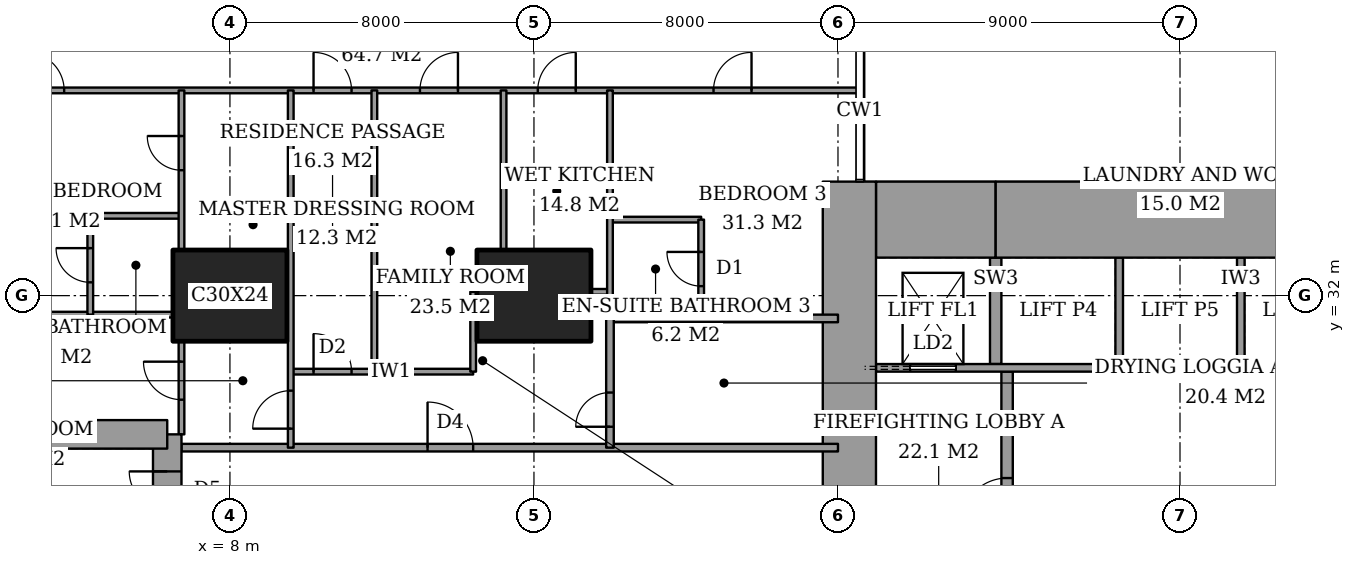
"""IFC4 building model, lengths in metres.
Left out: names, types, materials, properties, quantities, classifications, styles, units other than length and angle.
Written with IfcOpenShell. Run it as: python <this file> out.ifc"""

import sys

from ifc_helpers import new_model, si_unit, direction, frame, frame_2d, origin, origin_2d, place, context, subcontext, project, spatial, rectangle, extrude, element, fill, save


model = new_model("IFC4")
c1 = context("Model", 3, precision=1e-05, world=origin(), true_north=direction((0.0, 1.0)))
c2 = subcontext(c1, "Body", "Model", "MODEL_VIEW")
j1 = project(units=[si_unit("LENGTHUNIT", "METRE"), si_unit("PLANEANGLEUNIT", "RADIAN")], contexts=[c1])
p1 = place(None, origin())
s1 = spatial("IfcSite", under=j1, at=p1, CompositionType="ELEMENT")
p2 = place(p1, origin())
s2 = spatial("IfcBuilding", under=s1, at=p2, CompositionType="ELEMENT")
p3 = place(p2, frame((0.0, 0.0, 62.0)))
s3 = spatial("IfcBuildingStorey", under=s2, at=p3, CompositionType="ELEMENT", Elevation=62.0)
for number, where, z_axis, x_axis in (
    (1, (8.0, 32.0, 0.0), (0.0, 0.0, 1.0), (1.0, 0.0, 0.0)),
    (2, (16.0, 32.0, 0.0), (0.0, 0.0, 1.0), (1.0, 0.0, 0.0)),
):
    element("IfcColumn", number, at=place(p3, frame(where, z_axis=z_axis, x_axis=x_axis)), inside=s3, PredefinedType="COLUMN", context=c2, shape_type="SweptSolid", body=[
        extrude(rectangle(XDim=3.0, YDim=2.4, at=origin_2d()), origin(), (0.0, 0.0, 1.0), 3.6),
    ])
p4 = place(p3, frame((25.0, 34.0, 0.0), z_axis=(0.0, 0.0, 1.0), x_axis=(1.0, 0.0, 0.0)))
e3 = element("IfcWall", 3, at=p4, inside=s3, PredefinedType="SHEAR", context=c2, shape_type="SweptSolid", body=[
    extrude(rectangle(XDim=3.15, YDim=2.0, at=frame_2d((1.575, 0.0))), origin(), (0.0, 0.0, 1.0), 3.6),
])
p5 = place(p3, frame((28.15, 34.0, 0.0), z_axis=(0.0, 0.0, 1.0), x_axis=(1.0, 0.0, 0.0)))
e4 = element("IfcWall", 4, at=p5, inside=s3, PredefinedType="SHEAR", context=c2, shape_type="SweptSolid", body=[
    extrude(rectangle(XDim=9.7, YDim=2.0, at=frame_2d((4.85, 0.0))), origin(), (0.0, 0.0, 1.0), 3.6),
])
p6 = place(p3, frame((24.3, 23.15, 0.0), z_axis=(0.0, 0.0, 1.0), x_axis=(0.0, 1.0, 0.0)))
e5 = element("IfcWall", 5, at=p6, inside=s3, PredefinedType="SHEAR", context=c2, shape_type="SweptSolid", body=[
    extrude(rectangle(XDim=11.85, YDim=1.4, at=frame_2d((5.925, 0.0))), origin(), (0.0, 0.0, 1.0), 3.6),
])
p7 = place(p6, frame((0.75, 0.0, 0.0)))
e6 = element("IfcOpeningElement", 6, at=p7, cuts=e5, PredefinedType="OPENING", context=c2, shape_type="SweptSolid", body=[
    extrude(rectangle(XDim=1.8, YDim=2.4, at=frame_2d((0.9, 1.2))), frame((0.0, 0.71, 0.0), z_axis=(0.0, -1.0, 0.0), x_axis=(1.0, 0.0, 0.0)), (0.0, 0.0, 1.0), 1.42),
])
p8 = place(p3, frame((28.45, 23.3, 0.0), z_axis=(0.0, 0.0, 1.0), x_axis=(0.0, 1.0, 0.0)))
e7 = element("IfcWall", 7, at=p8, inside=s3, PredefinedType="PARTITIONING", context=c2, shape_type="SweptSolid", body=[
    extrude(rectangle(XDim=6.7, YDim=0.3, at=frame_2d((3.35, 0.0))), origin(), (0.0, 0.0, 1.0), 3.6),
])
p9 = place(p8, frame((2.7, 0.0, 0.0)))
e8 = element("IfcOpeningElement", 8, at=p9, cuts=e7, PredefinedType="OPENING", context=c2, shape_type="SweptSolid", body=[
    extrude(rectangle(XDim=1.2, YDim=2.1, at=frame_2d((0.6, 1.05))), frame((0.0, 0.16, 0.0), z_axis=(0.0, -1.0, 0.0), x_axis=(1.0, 0.0, 0.0)), (0.0, 0.0, 1.0), 0.32),
])
p10 = place(p3, frame((6.35, 19.65, 0.0), z_axis=(0.0, 0.0, 1.0), x_axis=(0.0, 1.0, 0.0)))
e9 = element("IfcWall", 9, at=p10, inside=s3, PredefinedType="SHEAR", context=c2, shape_type="SweptSolid", body=[
    extrude(rectangle(XDim=8.7, YDim=0.75, at=frame_2d((4.35, 0.0))), origin(), (0.0, 0.0, 1.0), 3.6),
])
p11 = place(p10, frame((6.725, 0.0, 0.0)))
e10 = element("IfcOpeningElement", 10, at=p11, cuts=e9, PredefinedType="OPENING", context=c2, shape_type="SweptSolid", body=[
    extrude(rectangle(XDim=1.0, YDim=2.1, at=frame_2d((0.5, 1.05))), frame((0.0, 0.385, 0.0), z_axis=(0.0, -1.0, 0.0), x_axis=(1.0, 0.0, 0.0)), (0.0, 0.0, 1.0), 0.77),
])
p12 = place(p3, frame((6.35, 28.35, 0.0), z_axis=(0.0, 0.0, 1.0), x_axis=(-1.0, 0.0, 0.0)))
e11 = element("IfcWall", 11, at=p12, inside=s3, PredefinedType="SHEAR", context=c2, shape_type="SweptSolid", body=[
    extrude(rectangle(XDim=4.45, YDim=0.75, at=frame_2d((2.225, 0.0))), origin(), (0.0, 0.0, 1.0), 3.6),
])
p13 = place(p3, frame((6.725, 28.0, 0.0), z_axis=(0.0, 0.0, 1.0), x_axis=(1.0, 0.0, 0.0)))
e12 = element("IfcWall", 12, at=p13, inside=s3, PredefinedType="PARTITIONING", context=c2, shape_type="SweptSolid", body=[
    extrude(rectangle(XDim=17.275, YDim=0.2, at=frame_2d((8.637, 0.0))), origin(), (0.0, 0.0, 1.0), 3.35),
])
p14 = place(p13, frame((6.475, 0.0, 0.0)))
e13 = element("IfcOpeningElement", 13, at=p14, cuts=e12, PredefinedType="OPENING", context=c2, shape_type="SweptSolid", body=[
    extrude(rectangle(XDim=1.2, YDim=2.4, at=frame_2d((0.6, 1.2))), frame((0.0, 0.11, 0.0), z_axis=(0.0, -1.0, 0.0), x_axis=(1.0, 0.0, 0.0)), (0.0, 0.0, 1.0), 0.22),
])
p15 = place(p3, frame((9.6, 30.0, 0.0), z_axis=(0.0, 0.0, 1.0), x_axis=(1.0, 0.0, 0.0)))
e14 = element("IfcWall", 14, at=p15, inside=s3, PredefinedType="PARTITIONING", context=c2, shape_type="SweptSolid", body=[
    extrude(rectangle(XDim=4.8, YDim=0.15, at=frame_2d((2.4, 0.0))), origin(), (0.0, 0.0, 1.0), 3.35),
])
p16 = place(p15, frame((0.6, 0.0, 0.0)))
e15 = element("IfcOpeningElement", 15, at=p16, cuts=e14, PredefinedType="OPENING", context=c2, shape_type="SweptSolid", body=[
    extrude(rectangle(XDim=1.0, YDim=2.1, at=frame_2d((0.5, 1.05))), frame((0.0, 0.085, 0.0), z_axis=(0.0, -1.0, 0.0), x_axis=(1.0, 0.0, 0.0)), (0.0, 0.0, 1.0), 0.17),
])
p17 = place(p3, frame((18.0, 31.4, 0.0), z_axis=(0.0, 0.0, 1.0), x_axis=(1.0, 0.0, 0.0)))
e16 = element("IfcWall", 16, at=p17, inside=s3, PredefinedType="PARTITIONING", context=c2, shape_type="SweptSolid", body=[
    extrude(rectangle(XDim=6.0, YDim=0.2, at=frame_2d((3.0, 0.0))), origin(), (0.0, 0.0, 1.0), 3.35),
])
p18 = place(p3, frame((1.35, 31.5, 0.0), z_axis=(0.0, 0.0, 1.0), x_axis=(1.0, 0.0, 0.0)))
e17 = element("IfcWall", 17, at=p18, inside=s3, PredefinedType="PARTITIONING", context=c2, shape_type="SweptSolid", body=[
    extrude(rectangle(XDim=5.15, YDim=0.15, at=frame_2d((2.575, 0.0))), origin(), (0.0, 0.0, 1.0), 3.35),
])
p19 = place(p3, frame((17.5, 32.1, 0.0), z_axis=(0.0, 0.0, 1.0), x_axis=(1.0, 0.0, 0.0)))
e18 = element("IfcWall", 18, at=p19, inside=s3, PredefinedType="PARTITIONING", context=c2, shape_type="SweptSolid", body=[
    extrude(rectangle(XDim=0.5, YDim=0.15, at=frame_2d((0.25, 0.0))), origin(), (0.0, 0.0, 1.0), 2.634),
])
p20 = place(p3, frame((18.0, 34.0, 0.0), z_axis=(0.0, 0.0, 1.0), x_axis=(1.0, 0.0, 0.0)))
e19 = element("IfcWall", 19, at=p20, inside=s3, PredefinedType="PARTITIONING", context=c2, shape_type="SweptSolid", body=[
    extrude(rectangle(XDim=2.4, YDim=0.15, at=frame_2d((1.2, 0.0))), origin(), (0.0, 0.0, 1.0), 3.35),
])
p21 = place(p3, frame((4.325, 34.1, 0.0), z_axis=(0.0, 0.0, 1.0), x_axis=(1.0, 0.0, 0.0)))
e20 = element("IfcWall", 20, at=p21, inside=s3, PredefinedType="PARTITIONING", context=c2, shape_type="SweptSolid", body=[
    extrude(rectangle(XDim=2.4, YDim=0.15, at=frame_2d((1.2, 0.0))), origin(), (0.0, 0.0, 1.0), 3.35),
])
p22 = place(p3, frame((-0.45, 37.4, 0.0), z_axis=(0.0, 0.0, 1.0), x_axis=(1.0, 0.0, 0.0)))
e21 = element("IfcWall", 21, at=p22, inside=s3, PredefinedType="PARTITIONING", context=c2, shape_type="SweptSolid", body=[
    extrude(rectangle(XDim=25.011, YDim=0.15, at=frame_2d((12.505, 0.0))), origin(), (0.0, 0.0, 1.0), 3.35),
])
p23 = place(p22, frame((10.65, 0.0, 0.0)))
e22 = element("IfcOpeningElement", 22, at=p23, cuts=e21, PredefinedType="OPENING", context=c2, shape_type="SweptSolid", body=[
    extrude(rectangle(XDim=1.0, YDim=2.1, at=frame_2d((0.5, 1.05))), frame((0.0, 0.085, 0.0), z_axis=(0.0, -1.0, 0.0), x_axis=(1.0, 0.0, 0.0)), (0.0, 0.0, 1.0), 0.17),
])
p24 = place(p22, frame((3.087, 0.0, 0.0)))
e23 = element("IfcOpeningElement", 23, at=p24, cuts=e21, PredefinedType="OPENING", context=c2, shape_type="SweptSolid", body=[
    extrude(rectangle(XDim=1.0, YDim=2.1, at=frame_2d((0.5, 1.05))), frame((0.0, 0.085, 0.0), z_axis=(0.0, -1.0, 0.0), x_axis=(1.0, 0.0, 0.0)), (0.0, 0.0, 1.0), 0.17),
])
p25 = place(p22, frame((13.45, 0.0, 0.0)))
e24 = element("IfcOpeningElement", 24, at=p25, cuts=e21, PredefinedType="OPENING", context=c2, shape_type="SweptSolid", body=[
    extrude(rectangle(XDim=1.0, YDim=2.1, at=frame_2d((0.5, 1.05))), frame((0.0, 0.085, 0.0), z_axis=(0.0, -1.0, 0.0), x_axis=(1.0, 0.0, 0.0)), (0.0, 0.0, 1.0), 0.17),
])
p26 = place(p22, frame((16.55, 0.0, 0.0)))
e25 = element("IfcOpeningElement", 25, at=p26, cuts=e21, PredefinedType="OPENING", context=c2, shape_type="SweptSolid", body=[
    extrude(rectangle(XDim=1.0, YDim=2.1, at=frame_2d((0.5, 1.05))), frame((0.0, 0.085, 0.0), z_axis=(0.0, -1.0, 0.0), x_axis=(1.0, 0.0, 0.0)), (0.0, 0.0, 1.0), 0.17),
])
p27 = place(p22, frame((21.175, 0.0, 0.0)))
e26 = element("IfcOpeningElement", 26, at=p27, cuts=e21, PredefinedType="OPENING", context=c2, shape_type="SweptSolid", body=[
    extrude(rectangle(XDim=1.0, YDim=2.1, at=frame_2d((0.5, 1.05))), frame((0.0, 0.085, 0.0), z_axis=(0.0, -1.0, 0.0), x_axis=(1.0, 0.0, 0.0)), (0.0, 0.0, 1.0), 0.17),
])
p28 = place(p3, frame((4.325, 31.5, 0.0), z_axis=(0.0, 0.0, 1.0), x_axis=(0.0, 1.0, 0.0)))
e27 = element("IfcWall", 27, at=p28, inside=s3, PredefinedType="PARTITIONING", context=c2, shape_type="SweptSolid", body=[
    extrude(rectangle(XDim=2.6, YDim=0.15, at=frame_2d((1.3, 0.0))), origin(), (0.0, 0.0, 1.0), 3.35),
])
p29 = place(p28, frame((0.85, 0.0, 0.0)))
e28 = element("IfcOpeningElement", 28, at=p29, cuts=e27, PredefinedType="OPENING", context=c2, shape_type="SweptSolid", body=[
    extrude(rectangle(XDim=0.9, YDim=2.1, at=frame_2d((0.45, 1.05))), frame((0.0, 0.085, 0.0), z_axis=(0.0, -1.0, 0.0), x_axis=(1.0, 0.0, 0.0)), (0.0, 0.0, 1.0), 0.17),
])
p30 = place(p3, frame((6.725, 28.35, 0.0), z_axis=(0.0, 0.0, 1.0), x_axis=(0.0, 1.0, 0.0)))
e29 = element("IfcWall", 29, at=p30, inside=s3, PredefinedType="PARTITIONING", context=c2, shape_type="SweptSolid", body=[
    extrude(rectangle(XDim=2.45, YDim=0.15, at=frame_2d((1.225, 0.0))), origin(), (0.0, 0.0, 1.0), 3.35),
])
p31 = place(p30, frame((0.913, 0.0, 0.0)))
e30 = element("IfcOpeningElement", 30, at=p31, cuts=e29, PredefinedType="OPENING", context=c2, shape_type="SweptSolid", body=[
    extrude(rectangle(XDim=1.0, YDim=2.1, at=frame_2d((0.5, 1.05))), frame((0.0, 0.085, 0.0), z_axis=(0.0, -1.0, 0.0), x_axis=(1.0, 0.0, 0.0)), (0.0, 0.0, 1.0), 0.17),
])
p32 = place(p3, frame((6.725, 33.2, 0.0), z_axis=(0.0, 0.0, 1.0), x_axis=(0.0, 1.0, 0.0)))
e31 = element("IfcWall", 31, at=p32, inside=s3, PredefinedType="PARTITIONING", context=c2, shape_type="SweptSolid", body=[
    extrude(rectangle(XDim=4.2, YDim=0.15, at=frame_2d((2.1, 0.0))), origin(), (0.0, 0.0, 1.0), 3.35),
])
p33 = place(p32, frame((2.1, 0.0, 0.0)))
e32 = element("IfcOpeningElement", 32, at=p33, cuts=e31, PredefinedType="OPENING", context=c2, shape_type="SweptSolid", body=[
    extrude(rectangle(XDim=0.9, YDim=2.1, at=frame_2d((0.45, 1.05))), frame((0.0, 0.085, 0.0), z_axis=(0.0, -1.0, 0.0), x_axis=(1.0, 0.0, 0.0)), (0.0, 0.0, 1.0), 0.17),
])
p34 = place(p3, frame((9.6, 28.0, 0.0), z_axis=(0.0, 0.0, 1.0), x_axis=(0.0, 1.0, 0.0)))
e33 = element("IfcWall", 33, at=p34, inside=s3, PredefinedType="PARTITIONING", context=c2, shape_type="SweptSolid", body=[
    extrude(rectangle(XDim=9.4, YDim=0.15, at=frame_2d((4.7, 0.0))), origin(), (0.0, 0.0, 1.0), 3.35),
])
p35 = place(p34, frame((0.5, 0.0, 0.0)))
e34 = element("IfcOpeningElement", 34, at=p35, cuts=e33, PredefinedType="OPENING", context=c2, shape_type="SweptSolid", body=[
    extrude(rectangle(XDim=1.0, YDim=2.1, at=frame_2d((0.5, 1.05))), frame((0.0, 0.085, 0.0), z_axis=(0.0, -1.0, 0.0), x_axis=(1.0, 0.0, 0.0)), (0.0, 0.0, 1.0), 0.17),
])
p36 = place(p3, frame((11.8, 30.0, 0.0), z_axis=(0.0, 0.0, 1.0), x_axis=(0.0, 1.0, 0.0)))
e35 = element("IfcWall", 35, at=p36, inside=s3, PredefinedType="PARTITIONING", context=c2, shape_type="SweptSolid", body=[
    extrude(rectangle(XDim=7.4, YDim=0.15, at=frame_2d((3.7, 0.0))), origin(), (0.0, 0.0, 1.0), 3.35),
])
p37 = place(p3, frame((14.4, 30.0, 0.0), z_axis=(0.0, 0.0, 1.0), x_axis=(0.0, 1.0, 0.0)))
e36 = element("IfcWall", 36, at=p37, inside=s3, PredefinedType="PARTITIONING", context=c2, shape_type="SweptSolid", body=[
    extrude(rectangle(XDim=2.1, YDim=0.15, at=frame_2d((1.05, 0.0))), origin(), (0.0, 0.0, 1.0), 3.35),
])
p38 = place(p3, frame((15.2, 33.2, 0.0), z_axis=(0.0, 0.0, 1.0), x_axis=(0.0, 1.0, 0.0)))
e37 = element("IfcWall", 37, at=p38, inside=s3, PredefinedType="PARTITIONING", context=c2, shape_type="SweptSolid", body=[
    extrude(rectangle(XDim=4.2, YDim=0.15, at=frame_2d((2.1, 0.0))), origin(), (0.0, 0.0, 1.0), 3.35),
])
p39 = place(p3, frame((18.0, 28.0, 0.0), z_axis=(0.0, 0.0, 1.0), x_axis=(0.0, 1.0, 0.0)))
e38 = element("IfcWall", 38, at=p39, inside=s3, PredefinedType="PARTITIONING", context=c2, shape_type="SweptSolid", body=[
    extrude(rectangle(XDim=3.4, YDim=0.2, at=frame_2d((1.7, 0.0))), origin(), (0.0, 0.0, 1.0), 3.35),
])
p40 = place(p39, frame((0.55, 0.0, 0.0)))
e39 = element("IfcOpeningElement", 39, at=p40, cuts=e38, PredefinedType="OPENING", context=c2, shape_type="SweptSolid", body=[
    extrude(rectangle(XDim=0.9, YDim=2.1, at=frame_2d((0.45, 1.05))), frame((0.0, 0.11, 0.0), z_axis=(0.0, -1.0, 0.0), x_axis=(1.0, 0.0, 0.0)), (0.0, 0.0, 1.0), 0.22),
])
p41 = place(p3, frame((18.0, 31.4, 0.0), z_axis=(0.0, 0.0, 1.0), x_axis=(0.0, 1.0, 0.0)))
e40 = element("IfcWall", 40, at=p41, inside=s3, PredefinedType="PARTITIONING", context=c2, shape_type="SweptSolid", body=[
    extrude(rectangle(XDim=6.0, YDim=0.15, at=frame_2d((3.0, 0.0))), origin(), (0.0, 0.0, 1.0), 3.35),
])
p42 = place(p3, frame((20.4, 31.4, 0.0), z_axis=(0.0, 0.0, 1.0), x_axis=(0.0, 1.0, 0.0)))
e41 = element("IfcWall", 41, at=p42, inside=s3, PredefinedType="PARTITIONING", context=c2, shape_type="SweptSolid", body=[
    extrude(rectangle(XDim=2.6, YDim=0.15, at=frame_2d((1.3, 0.0))), origin(), (0.0, 0.0, 1.0), 3.35),
])
p43 = place(p42, frame((0.85, 0.0, 0.0)))
e42 = element("IfcOpeningElement", 42, at=p43, cuts=e41, PredefinedType="OPENING", context=c2, shape_type="SweptSolid", body=[
    extrude(rectangle(XDim=0.9, YDim=2.1, at=frame_2d((0.45, 1.05))), frame((0.0, 0.085, 0.0), z_axis=(0.0, -1.0, 0.0), x_axis=(1.0, 0.0, 0.0)), (0.0, 0.0, 1.0), 0.17),
])
p44 = place(p3, frame((25.0, 30.1, 0.0), z_axis=(0.0, 0.0, 1.0), x_axis=(1.0, 0.0, 0.0)))
e43 = element("IfcWall", 43, at=p44, inside=s3, PredefinedType="PARTITIONING", context=c2, shape_type="SweptSolid", body=[
    extrude(rectangle(XDim=12.7, YDim=0.2, at=frame_2d((6.35, 0.0))), origin(), (0.0, 0.0, 1.0), 3.6),
])
p45 = place(p44, frame((0.9, 0.0, 0.0)))
e44 = element("IfcOpeningElement", 44, at=p45, cuts=e43, PredefinedType="OPENING", context=c2, shape_type="SweptSolid", body=[
    extrude(rectangle(XDim=1.2, YDim=2.1, at=frame_2d((0.6, 1.05))), frame((0.0, 0.11, 0.0), z_axis=(0.0, -1.0, 0.0), x_axis=(1.0, 0.0, 0.0)), (0.0, 0.0, 1.0), 0.22),
])
for number, where, z_axis, x_axis in (
    (45, (31.4, 30.2, 0.0), (0.0, 0.0, 1.0), (0.0, 1.0, 0.0)),
    (46, (34.6, 30.2, 0.0), (0.0, 0.0, 1.0), (0.0, 1.0, 0.0)),
):
    element("IfcWall", number, at=place(p3, frame(where, z_axis=z_axis, x_axis=x_axis)), inside=s3, PredefinedType="PARTITIONING", context=c2, shape_type="SweptSolid", body=[
        extrude(rectangle(XDim=2.8, YDim=0.2, at=frame_2d((1.4, 0.0))), origin(), (0.0, 0.0, 1.0), 3.6),
    ])
p46 = place(p3, frame((28.15, 30.2, 0.0), z_axis=(0.0, 0.0, 1.0), x_axis=(0.0, 1.0, 0.0)))
e47 = element("IfcWall", 47, at=p46, inside=s3, PredefinedType="SHEAR", context=c2, shape_type="SweptSolid", body=[
    extrude(rectangle(XDim=2.8, YDim=0.3, at=frame_2d((1.4, 0.0))), origin(), (0.0, 0.0, 1.0), 3.6),
])
p47 = place(p23, origin())
e48 = element("IfcDoor", 48, at=p47, inside=s3, OperationType="SINGLE_SWING_RIGHT", PredefinedType="DOOR", context=c2, shape_type="SweptSolid", body=[
    extrude(rectangle(XDim=1.0, YDim=2.1, at=frame_2d((0.5, 1.05))), frame((0.0, 0.025, 0.0), z_axis=(0.0, -1.0, 0.0), x_axis=(1.0, 0.0, 0.0)), (0.0, 0.0, 1.0), 0.05),
])
fill(e22, e48)
p48 = place(p29, origin())
e49 = element("IfcDoor", 49, at=p48, inside=s3, OperationType="SINGLE_SWING_LEFT", PredefinedType="DOOR", context=c2, shape_type="SweptSolid", body=[
    extrude(rectangle(XDim=0.9, YDim=2.1, at=frame_2d((0.45, 1.05))), frame((0.0, 0.025, 0.0), z_axis=(0.0, -1.0, 0.0), x_axis=(1.0, 0.0, 0.0)), (0.0, 0.0, 1.0), 0.05),
])
fill(e28, e49)
p49 = place(p24, origin())
e50 = element("IfcDoor", 50, at=p49, inside=s3, OperationType="SINGLE_SWING_RIGHT", PredefinedType="DOOR", context=c2, shape_type="SweptSolid", body=[
    extrude(rectangle(XDim=1.0, YDim=2.1, at=frame_2d((0.5, 1.05))), frame((0.0, 0.025, 0.0), z_axis=(0.0, -1.0, 0.0), x_axis=(1.0, 0.0, 0.0)), (0.0, 0.0, 1.0), 0.05),
])
fill(e23, e50)
p50 = place(p31, origin())
e51 = element("IfcDoor", 51, at=p50, inside=s3, OperationType="SINGLE_SWING_LEFT", PredefinedType="DOOR", context=c2, shape_type="SweptSolid", body=[
    extrude(rectangle(XDim=1.0, YDim=2.1, at=frame_2d((0.5, 1.05))), frame((0.0, 0.025, 0.0), z_axis=(0.0, -1.0, 0.0), x_axis=(1.0, 0.0, 0.0)), (0.0, 0.0, 1.0), 0.05),
])
fill(e30, e51)
p51 = place(p33, origin())
e52 = element("IfcDoor", 52, at=p51, inside=s3, OperationType="SINGLE_SWING_LEFT", PredefinedType="DOOR", context=c2, shape_type="SweptSolid", body=[
    extrude(rectangle(XDim=0.9, YDim=2.1, at=frame_2d((0.45, 1.05))), frame((0.0, 0.025, 0.0), z_axis=(0.0, -1.0, 0.0), x_axis=(1.0, 0.0, 0.0)), (0.0, 0.0, 1.0), 0.05),
])
fill(e32, e52)
p52 = place(p35, origin())
e53 = element("IfcDoor", 53, at=p52, inside=s3, OperationType="SINGLE_SWING_RIGHT", PredefinedType="DOOR", context=c2, shape_type="SweptSolid", body=[
    extrude(rectangle(XDim=1.0, YDim=2.1, at=frame_2d((0.5, 1.05))), frame((0.0, 0.025, 0.0), z_axis=(0.0, -1.0, 0.0), x_axis=(1.0, 0.0, 0.0)), (0.0, 0.0, 1.0), 0.05),
])
fill(e34, e53)
p53 = place(p14, origin())
e54 = element("IfcDoor", 54, at=p53, inside=s3, OperationType="SINGLE_SWING_RIGHT", PredefinedType="DOOR", context=c2, shape_type="SweptSolid", body=[
    extrude(rectangle(XDim=1.2, YDim=2.4, at=frame_2d((0.6, 1.2))), frame((0.0, 0.025, 0.0), z_axis=(0.0, -1.0, 0.0), x_axis=(1.0, 0.0, 0.0)), (0.0, 0.0, 1.0), 0.05),
])
fill(e13, e54)
p54 = place(p16, origin())
e55 = element("IfcDoor", 55, at=p54, inside=s3, OperationType="SINGLE_SWING_RIGHT", PredefinedType="DOOR", context=c2, shape_type="SweptSolid", body=[
    extrude(rectangle(XDim=1.0, YDim=2.1, at=frame_2d((0.5, 1.05))), frame((0.0, 0.025, 0.0), z_axis=(0.0, -1.0, 0.0), x_axis=(1.0, 0.0, 0.0)), (0.0, 0.0, 1.0), 0.05),
])
fill(e15, e55)
p55 = place(p25, origin())
e56 = element("IfcDoor", 56, at=p55, inside=s3, OperationType="SINGLE_SWING_LEFT", PredefinedType="DOOR", context=c2, shape_type="SweptSolid", body=[
    extrude(rectangle(XDim=1.0, YDim=2.1, at=frame_2d((0.5, 1.05))), frame((0.0, 0.025, 0.0), z_axis=(0.0, -1.0, 0.0), x_axis=(1.0, 0.0, 0.0)), (0.0, 0.0, 1.0), 0.05),
])
fill(e24, e56)
p56 = place(p26, origin())
e57 = element("IfcDoor", 57, at=p56, inside=s3, OperationType="SINGLE_SWING_LEFT", PredefinedType="DOOR", context=c2, shape_type="SweptSolid", body=[
    extrude(rectangle(XDim=1.0, YDim=2.1, at=frame_2d((0.5, 1.05))), frame((0.0, 0.025, 0.0), z_axis=(0.0, -1.0, 0.0), x_axis=(1.0, 0.0, 0.0)), (0.0, 0.0, 1.0), 0.05),
])
fill(e25, e57)
p57 = place(p43, origin())
e58 = element("IfcDoor", 58, at=p57, inside=s3, OperationType="SINGLE_SWING_LEFT", PredefinedType="DOOR", context=c2, shape_type="SweptSolid", body=[
    extrude(rectangle(XDim=0.9, YDim=2.1, at=frame_2d((0.45, 1.05))), frame((0.0, 0.025, 0.0), z_axis=(0.0, -1.0, 0.0), x_axis=(1.0, 0.0, 0.0)), (0.0, 0.0, 1.0), 0.05),
])
fill(e42, e58)
p58 = place(p27, origin())
e59 = element("IfcDoor", 59, at=p58, inside=s3, OperationType="SINGLE_SWING_LEFT", PredefinedType="DOOR", context=c2, shape_type="SweptSolid", body=[
    extrude(rectangle(XDim=1.0, YDim=2.1, at=frame_2d((0.5, 1.05))), frame((0.0, 0.025, 0.0), z_axis=(0.0, -1.0, 0.0), x_axis=(1.0, 0.0, 0.0)), (0.0, 0.0, 1.0), 0.05),
])
fill(e26, e59)
p59 = place(p40, origin())
e60 = element("IfcDoor", 60, at=p59, inside=s3, OperationType="SINGLE_SWING_RIGHT", PredefinedType="DOOR", context=c2, shape_type="SweptSolid", body=[
    extrude(rectangle(XDim=0.9, YDim=2.1, at=frame_2d((0.45, 1.05))), frame((0.0, 0.025, 0.0), z_axis=(0.0, -1.0, 0.0), x_axis=(1.0, 0.0, 0.0)), (0.0, 0.0, 1.0), 0.05),
])
fill(e39, e60)
p60 = place(p9, origin())
e61 = element("IfcDoor", 61, at=p60, inside=s3, OperationType="SINGLE_SWING_RIGHT", PredefinedType="DOOR", context=c2, shape_type="SweptSolid", body=[
    extrude(rectangle(XDim=1.2, YDim=2.1, at=frame_2d((0.6, 1.05))), frame((0.0, 0.025, 0.0), z_axis=(0.0, -1.0, 0.0), x_axis=(1.0, 0.0, 0.0)), (0.0, 0.0, 1.0), 0.05),
])
fill(e8, e61)
p61 = place(p45, origin())
e62 = element("IfcDoor", 62, at=p61, inside=s3, OperationType="SLIDING_TO_LEFT", PredefinedType="DOOR", context=c2, shape_type="SweptSolid", body=[
    extrude(rectangle(XDim=1.2, YDim=2.1, at=frame_2d((0.6, 1.05))), frame((0.0, 0.025, 0.0), z_axis=(0.0, -1.0, 0.0), x_axis=(1.0, 0.0, 0.0)), (0.0, 0.0, 1.0), 0.05),
])
fill(e44, e62)
p62 = place(p11, origin())
e63 = element("IfcDoor", 63, at=p62, inside=s3, OperationType="SINGLE_SWING_LEFT", PredefinedType="DOOR", context=c2, shape_type="SweptSolid", body=[
    extrude(rectangle(XDim=1.0, YDim=2.1, at=frame_2d((0.5, 1.05))), frame((0.0, 0.025, 0.0), z_axis=(0.0, -1.0, 0.0), x_axis=(1.0, 0.0, 0.0)), (0.0, 0.0, 1.0), 0.05),
])
fill(e10, e63)
save(model, sys.argv[1])
